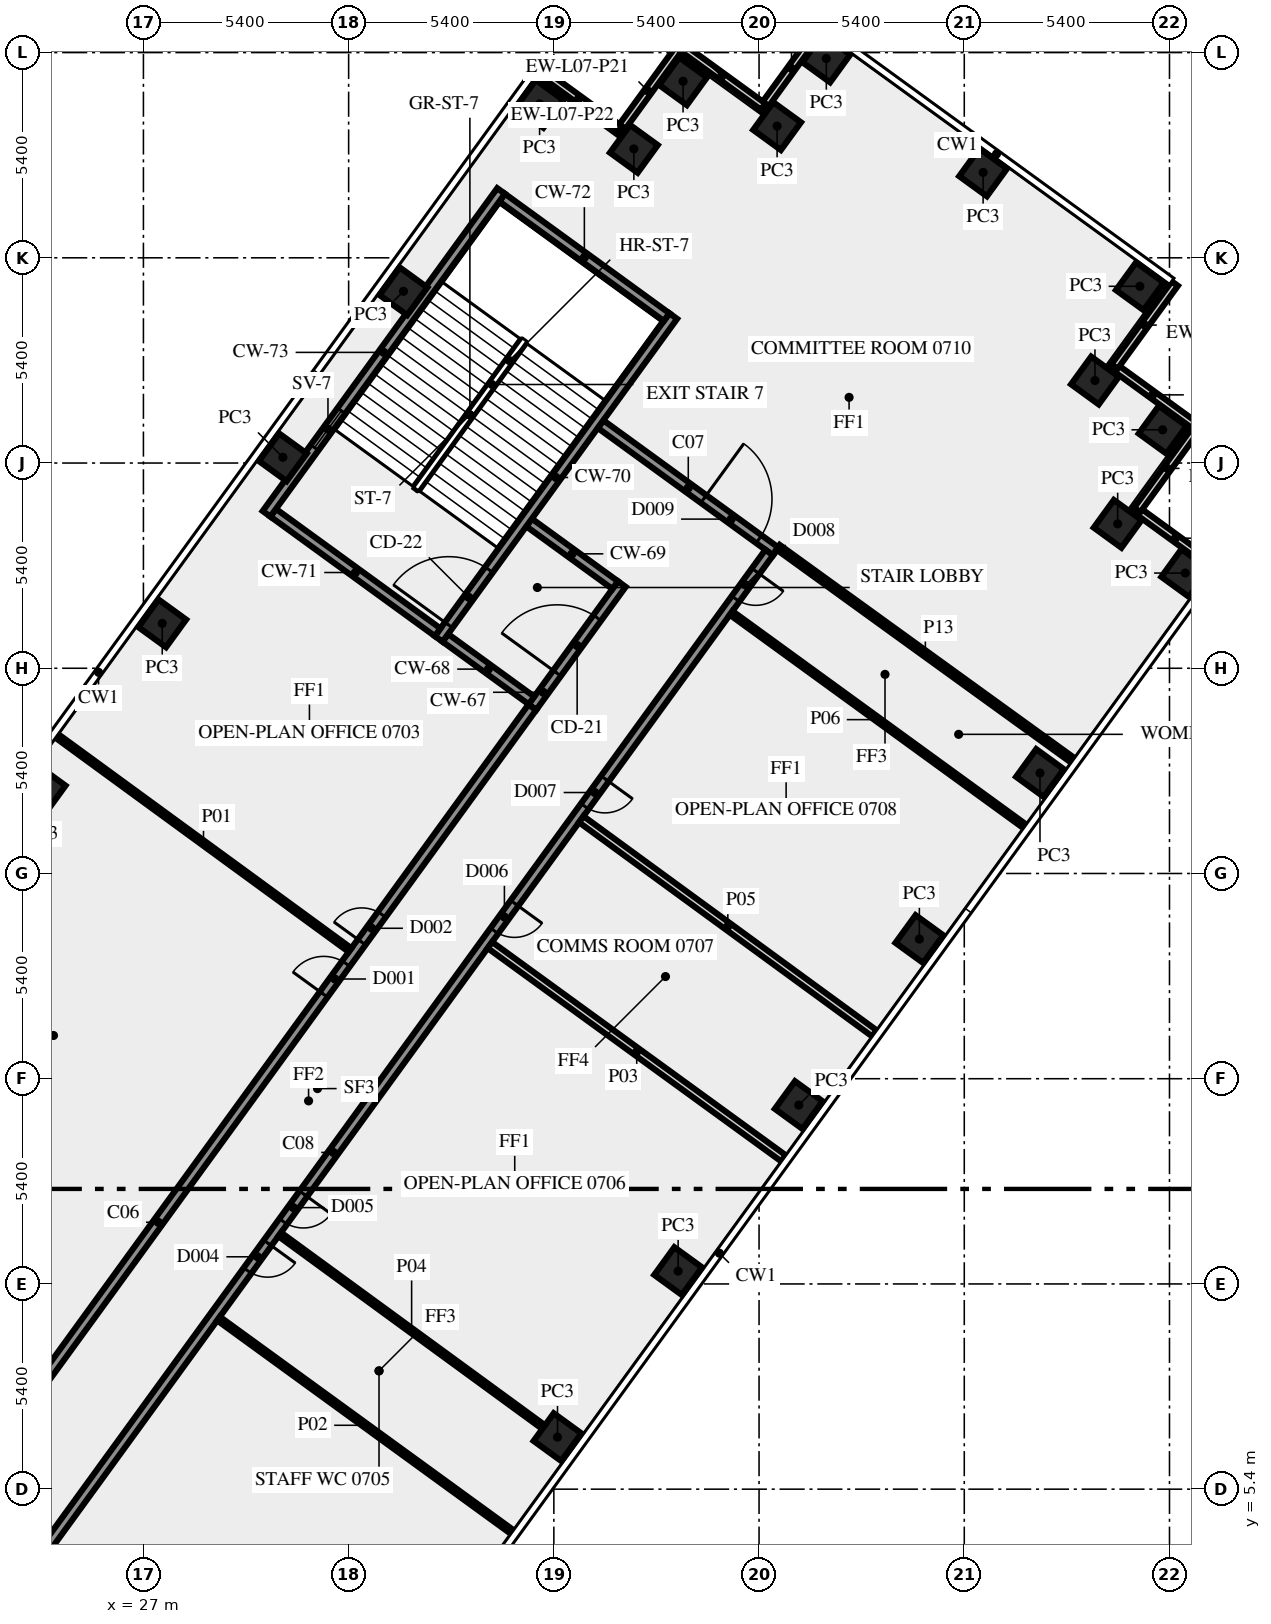
"""IFC4 building model, lengths in metres.
Left out: names, types, materials, properties, quantities, classifications, styles, units other than length and angle.
Written with IfcOpenShell. Run it as: python <this file> out.ifc"""

import sys

from ifc_helpers import new_model, si_unit, direction, frame, frame_2d, origin, origin_2d, place, context, subcontext, project, spatial, rectangle, extrude, element, fill, save


model = new_model("IFC4")
c1 = context("Model", 3, precision=1e-05, world=origin(), true_north=direction((0.0, 1.0)))
c2 = subcontext(c1, "Body", "Model", "MODEL_VIEW")
j1 = project(units=[si_unit("LENGTHUNIT", "METRE"), si_unit("PLANEANGLEUNIT", "RADIAN")], contexts=[c1])
p1 = place(None, origin())
s1 = spatial("IfcSite", under=j1, at=p1, CompositionType="ELEMENT")
p2 = place(p1, origin())
s2 = spatial("IfcBuilding", under=s1, at=p2, CompositionType="ELEMENT")
p3 = place(p2, frame((0.0, 0.0, 35.0)))
s3 = spatial("IfcBuildingStorey", under=s2, at=p3, CompositionType="ELEMENT", Elevation=35.0)
for number, where, z_axis, x_axis in (
    (1, (37.896, 6.769, 0.0), (0.0, 0.0, 1.0), (0.588, 0.809, 0.0)),
    (2, (41.07, 11.137, 0.0), (0.0, 0.0, 1.0), (0.588, 0.809, 0.0)),
    (3, (44.244, 15.506, 0.0), (0.0, 0.0, 1.0), (0.588, 0.809, 0.0)),
    (4, (47.418, 19.875, 0.0), (0.0, 0.0, 1.0), (0.588, 0.809, 0.0)),
    (5, (50.592, 24.243, 0.0), (0.0, 0.0, 1.0), (0.588, 0.809, 0.0)),
    (6, (54.415, 29.505, 0.0), (0.0, 0.0, 1.0), (0.588, 0.809, 0.0)),
    (7, (52.636, 30.8, 0.0), (0.0, 0.0, 1.0), (-0.809, 0.588, 0.0)),
    (8, (53.82, 33.275, 0.0), (0.0, 0.0, 1.0), (-0.809, 0.588, 0.0)),
    (9, (52.039, 34.571, 0.0), (0.0, 0.0, 1.0), (0.588, 0.809, 0.0)),
    (10, (53.22, 37.05, 0.0), (0.0, 0.0, 1.0), (-0.809, 0.588, 0.0)),
    (11, (49.096, 40.047, 0.0), (0.0, 0.0, 1.0), (-0.809, 0.588, 0.0)),
    (12, (44.97, 43.045, 0.0), (0.0, 0.0, 1.0), (-0.809, 0.588, 0.0)),
    (13, (43.675, 41.265, 0.0), (0.0, 0.0, 1.0), (-0.809, 0.588, 0.0)),
    (14, (41.2, 42.445, 0.0), (0.0, 0.0, 1.0), (-0.588, -0.809, 0.0)),
    (15, (39.906, 40.666, 0.0), (0.0, 0.0, 1.0), (-0.588, -0.809, 0.0)),
    (16, (37.425, 41.85, 0.0), (0.0, 0.0, 1.0), (-0.588, -0.809, 0.0)),
    (17, (33.843, 36.919, 0.0), (0.0, 0.0, 1.0), (-0.588, -0.809, 0.0)),
    (18, (30.669, 32.55, 0.0), (0.0, 0.0, 1.0), (-0.588, -0.809, 0.0)),
    (19, (27.495, 28.181, 0.0), (0.0, 0.0, 1.0), (-0.588, -0.809, 0.0)),
    (20, (24.321, 23.812, 0.0), (0.0, 0.0, 1.0), (-0.588, -0.809, 0.0)),
):
    element("IfcColumn", number, at=place(p3, frame(where, z_axis=z_axis, x_axis=x_axis)), inside=s3, PredefinedType="COLUMN", context=c2, shape_type="SweptSolid", body=[
        extrude(rectangle(XDim=0.9, YDim=0.9, at=origin_2d()), origin(), (0.0, 0.0, 1.0), 3.65),
    ])
p4 = place(p3, frame((55.247, 29.629, 0.0), z_axis=(0.0, 0.0, 1.0), x_axis=(-0.809033161865, 0.587762999008, 0.0)))
e21 = element("IfcWall", 21, at=p4, inside=s3, PredefinedType="SOLIDWALL", context=c2, shape_type="SweptSolid", body=[
    extrude(rectangle(XDim=2.7, YDim=0.2, at=frame_2d((1.35, 0.0))), origin(), (0.0, 0.0, 1.0), 3.65),
])
p5 = place(p3, frame((53.151, 31.167, 0.0), z_axis=(0.0, 0.0, 1.0), x_axis=(0.587779184282, 0.809021403008, 0.0)))
e22 = element("IfcWall", 22, at=p5, inside=s3, PredefinedType="SOLIDWALL", context=c2, shape_type="SweptSolid", body=[
    extrude(rectangle(XDim=2.7, YDim=0.2, at=frame_2d((1.35, 0.0))), origin(), (0.0, 0.0, 1.0), 3.65),
])
for number, where, z_axis, x_axis in (
    (23, (54.65, 33.4, 0.0), (0.0, 0.0, 1.0), (-0.809, 0.588, 0.0)),
    (24, (52.553, 34.938, 0.0), (0.0, 0.0, 1.0), (0.588, 0.809, 0.0)),
    (25, (44.846, 43.875, 0.0), (0.0, 0.0, 1.0), (-0.588, -0.809, 0.0)),
    (26, (43.308, 41.779, 0.0), (0.0, 0.0, 1.0), (-0.809, 0.588, 0.0)),
):
    element("IfcWall", number, at=place(p3, frame(where, z_axis=z_axis, x_axis=x_axis)), inside=s3, PredefinedType="SOLIDWALL", context=c2, shape_type="SweptSolid", body=[
        extrude(rectangle(XDim=2.7, YDim=0.2, at=frame_2d((1.35, 0.0))), origin(), (0.0, 0.0, 1.0), 3.65),
    ])
p6 = place(p3, frame((41.075, 43.278, 0.0), z_axis=(0.0, 0.0, 1.0), x_axis=(-0.587806000234, -0.809001919707, 0.0)))
e27 = element("IfcWall", 27, at=p6, inside=s3, PredefinedType="SOLIDWALL", context=c2, shape_type="SweptSolid", body=[
    extrude(rectangle(XDim=2.7, YDim=0.2, at=frame_2d((1.35, 0.0))), origin(), (0.0, 0.0, 1.0), 3.65),
])
p7 = place(p3, frame((39.537, 41.181, 0.0), z_axis=(0.0, 0.0, 1.0), x_axis=(-0.809033161865, 0.587762999008, 0.0)))
e28 = element("IfcWall", 28, at=p7, inside=s3, PredefinedType="SOLIDWALL", context=c2, shape_type="SweptSolid", body=[
    extrude(rectangle(XDim=2.7, YDim=0.2, at=frame_2d((1.35, 0.0))), origin(), (0.0, 0.0, 1.0), 3.65),
])
p8 = place(p3, frame((37.238, 25.98, 0.0), z_axis=(0.0, 0.0, 1.0), x_axis=(0.587772420479, 0.809026317077, 0.0)))
e29 = element("IfcWall", 29, at=p8, inside=s3, PredefinedType="SHEAR", context=c2, shape_type="SweptSolid", body=[
    extrude(rectangle(XDim=4.0, YDim=0.25, at=frame_2d((2.0, 0.0))), origin(), (0.0, 0.0, 1.0), 3.65),
])
p9 = place(p8, frame((1.1, 0.0, 0.0)))
e30 = element("IfcOpeningElement", 30, at=p9, cuts=e29, PredefinedType="OPENING", context=c2, shape_type="SweptSolid", body=[
    extrude(rectangle(XDim=1.8, YDim=2.1, at=frame_2d((0.9, 1.05))), frame((0.0, 0.135, 0.0), z_axis=(0.0, -1.0, 0.0), x_axis=(1.0, 0.0, 0.0)), (0.0, 0.0, 1.0), 0.27),
])
for number, where, z_axis, x_axis in (
    (31, (37.21, 26.154, 0.0), (0.0, 0.0, 1.0), (-0.809, 0.588, 0.0)),
    (32, (39.414, 29.188, 0.0), (0.0, 0.0, 1.0), (-0.809, 0.588, 0.0)),
):
    element("IfcWall", number, at=place(p3, frame(where, z_axis=z_axis, x_axis=x_axis)), inside=s3, PredefinedType="SHEAR", context=c2, shape_type="SweptSolid", body=[
        extrude(rectangle(XDim=2.8, YDim=0.25, at=frame_2d((1.4, 0.0))), origin(), (0.0, 0.0, 1.0), 3.65),
    ])
p10 = place(p3, frame((34.77, 27.772, 0.0), z_axis=(0.0, 0.0, 1.0), x_axis=(0.587795589702, 0.809009483706, 0.0)))
e33 = element("IfcWall", 33, at=p10, inside=s3, PredefinedType="SHEAR", context=c2, shape_type="SweptSolid", body=[
    extrude(rectangle(XDim=10.5, YDim=0.25, at=frame_2d((5.25, 0.0))), origin(), (0.0, 0.0, 1.0), 3.65),
])
p11 = place(p10, frame((0.45, 0.0, 0.0)))
e34 = element("IfcOpeningElement", 34, at=p11, cuts=e33, PredefinedType="OPENING", context=c2, shape_type="SweptSolid", body=[
    extrude(rectangle(XDim=1.8, YDim=2.1, at=frame_2d((0.9, 1.05))), frame((0.0, 0.135, 0.0), z_axis=(0.0, -1.0, 0.0), x_axis=(1.0, 0.0, 0.0)), (0.0, 0.0, 1.0), 0.27),
])
p12 = place(p3, frame((34.742, 27.947, 0.0), z_axis=(0.0, 0.0, 1.0), x_axis=(-0.8089984606, 0.587810760999, 0.0)))
e35 = element("IfcWall", 35, at=p12, inside=s3, PredefinedType="SHEAR", context=c2, shape_type="SweptSolid", body=[
    extrude(rectangle(XDim=5.35, YDim=0.25, at=frame_2d((2.675, 0.0))), origin(), (0.0, 0.0, 1.0), 3.65),
])
p13 = place(p3, frame((40.767, 36.24, 0.0), z_axis=(0.0, 0.0, 1.0), x_axis=(-0.809020161303, 0.587780893365, 0.0)))
e36 = element("IfcWall", 36, at=p13, inside=s3, PredefinedType="SHEAR", context=c2, shape_type="SweptSolid", body=[
    extrude(rectangle(XDim=5.35, YDim=0.25, at=frame_2d((2.675, 0.0))), origin(), (0.0, 0.0, 1.0), 3.65),
])
p14 = place(p3, frame((30.24, 31.064, 0.0), z_axis=(0.0, 0.0, 1.0), x_axis=(0.587795589702, 0.809009483706, 0.0)))
e37 = element("IfcWall", 37, at=p14, inside=s3, PredefinedType="SHEAR", context=c2, shape_type="SweptSolid", body=[
    extrude(rectangle(XDim=10.5, YDim=0.25, at=frame_2d((5.25, 0.0))), origin(), (0.0, 0.0, 1.0), 3.65),
])
p15 = place(p14, frame((2.15, 0.0, 1.0)))
e38 = element("IfcOpeningElement", 38, at=p15, cuts=e37, PredefinedType="OPENING", context=c2, shape_type="SweptSolid", body=[
    extrude(rectangle(XDim=1.2, YDim=1.2, at=frame_2d((0.6, 0.6))), frame((0.0, 0.135, 0.0), z_axis=(0.0, -1.0, 0.0), x_axis=(1.0, 0.0, 0.0)), (0.0, 0.0, 1.0), 0.27),
])
p16 = place(p3, frame((17.545, -1.125, 0.0), z_axis=(0.0, 0.0, 1.0), x_axis=(0.587786323093, 0.809016216391, 0.0)))
e39 = element("IfcWall", 39, at=p16, inside=s3, PredefinedType="SOLIDWALL", context=c2, shape_type="SweptSolid", body=[
    extrude(rectangle(XDim=33.493, YDim=0.25, at=frame_2d((16.747, 0.0))), origin(), (0.0, 0.0, 1.0), 3.65),
])
p17 = place(p16, frame((25.857, 0.0, 0.0)))
e40 = element("IfcOpeningElement", 40, at=p17, cuts=e39, PredefinedType="OPENING", context=c2, shape_type="SweptSolid", body=[
    extrude(rectangle(XDim=0.9, YDim=2.1, at=frame_2d((0.45, 1.05))), frame((0.0, 0.135, 0.0), z_axis=(0.0, -1.0, 0.0), x_axis=(1.0, 0.0, 0.0)), (0.0, 0.0, 1.0), 0.27),
])
p18 = place(p16, frame((24.157, 0.0, 0.0)))
e41 = element("IfcOpeningElement", 41, at=p18, cuts=e39, PredefinedType="OPENING", context=c2, shape_type="SweptSolid", body=[
    extrude(rectangle(XDim=1.0, YDim=2.1, at=frame_2d((0.5, 1.05))), frame((0.0, 0.135, 0.0), z_axis=(0.0, -1.0, 0.0), x_axis=(1.0, 0.0, 0.0)), (0.0, 0.0, 1.0), 0.27),
])
p19 = place(p3, frame((39.034, 33.42, 0.0), z_axis=(0.0, 0.0, 1.0), x_axis=(0.809023325802, -0.587776537732, 0.0)))
e42 = element("IfcWall", 42, at=p19, inside=s3, PredefinedType="SOLIDWALL", context=c2, shape_type="SweptSolid", body=[
    extrude(rectangle(XDim=5.695, YDim=0.25, at=frame_2d((2.848, 0.0))), origin(), (0.0, 0.0, 1.0), 3.65),
])
p20 = place(p19, frame((3.345, 0.0, 0.0)))
e43 = element("IfcOpeningElement", 43, at=p20, cuts=e42, PredefinedType="OPENING", context=c2, shape_type="SweptSolid", body=[
    extrude(rectangle(XDim=1.8, YDim=2.1, at=frame_2d((0.9, 1.05))), frame((0.0, 0.135, 0.0), z_axis=(0.0, -1.0, 0.0), x_axis=(1.0, 0.0, 0.0)), (0.0, 0.0, 1.0), 0.27),
])
p21 = place(p3, frame((43.467, 30.045, 0.0), z_axis=(0.0, 0.0, 1.0), x_axis=(-0.587784726077, -0.809017376692, 0.0)))
e44 = element("IfcWall", 44, at=p21, inside=s3, PredefinedType="SOLIDWALL", context=c2, shape_type="SweptSolid", body=[
    extrude(rectangle(XDim=39.02, YDim=0.25, at=frame_2d((19.51, 0.0))), origin(), (0.0, 0.0, 1.0), 3.65),
])
p22 = place(p21, frame((37.588, 0.0, 0.0)))
e45 = element("IfcOpeningElement", 45, at=p22, cuts=e44, PredefinedType="OPENING", context=c2, shape_type="SweptSolid", body=[
    extrude(rectangle(XDim=0.9, YDim=2.1, at=frame_2d((0.45, 1.05))), frame((0.0, 0.135, 0.0), z_axis=(0.0, -1.0, 0.0), x_axis=(1.0, 0.0, 0.0)), (0.0, 0.0, 1.0), 0.27),
])
p23 = place(p21, frame((20.855, 0.0, 0.0)))
e46 = element("IfcOpeningElement", 46, at=p23, cuts=e44, PredefinedType="OPENING", context=c2, shape_type="SweptSolid", body=[
    extrude(rectangle(XDim=0.9, YDim=2.1, at=frame_2d((0.45, 1.05))), frame((0.0, 0.135, 0.0), z_axis=(0.0, -1.0, 0.0), x_axis=(1.0, 0.0, 0.0)), (0.0, 0.0, 1.0), 0.27),
])
p24 = place(p21, frame((7.355, 0.0, 0.0)))
e47 = element("IfcOpeningElement", 47, at=p24, cuts=e44, PredefinedType="OPENING", context=c2, shape_type="SweptSolid", body=[
    extrude(rectangle(XDim=0.9, YDim=2.1, at=frame_2d((0.45, 1.05))), frame((0.0, 0.135, 0.0), z_axis=(0.0, -1.0, 0.0), x_axis=(1.0, 0.0, 0.0)), (0.0, 0.0, 1.0), 0.27),
])
p25 = place(p21, frame((11.404, 0.0, 0.0)))
e48 = element("IfcOpeningElement", 48, at=p25, cuts=e44, PredefinedType="OPENING", context=c2, shape_type="SweptSolid", body=[
    extrude(rectangle(XDim=0.9, YDim=2.1, at=frame_2d((0.45, 1.05))), frame((0.0, 0.135, 0.0), z_axis=(0.0, -1.0, 0.0), x_axis=(1.0, 0.0, 0.0)), (0.0, 0.0, 1.0), 0.27),
])
p26 = place(p21, frame((0.604, 0.0, 0.0)))
e49 = element("IfcOpeningElement", 49, at=p26, cuts=e44, PredefinedType="OPENING", context=c2, shape_type="SweptSolid", body=[
    extrude(rectangle(XDim=0.9, YDim=2.1, at=frame_2d((0.45, 1.05))), frame((0.0, 0.135, 0.0), z_axis=(0.0, -1.0, 0.0), x_axis=(1.0, 0.0, 0.0)), (0.0, 0.0, 1.0), 0.27),
])
p27 = place(p21, frame((22.455, 0.0, 0.0)))
e50 = element("IfcOpeningElement", 50, at=p27, cuts=e44, PredefinedType="OPENING", context=c2, shape_type="SweptSolid", body=[
    extrude(rectangle(XDim=0.9, YDim=2.1, at=frame_2d((0.45, 1.05))), frame((0.0, 0.135, 0.0), z_axis=(0.0, -1.0, 0.0), x_axis=(1.0, 0.0, 0.0)), (0.0, 0.0, 1.0), 0.27),
])
p28 = place(p3, frame((24.724, 25.217, 0.0), z_axis=(0.0, 0.0, 1.0), x_axis=(0.807606997933, -0.589721067023, 0.0)))
e51 = element("IfcWall", 51, at=p28, inside=s3, PredefinedType="PARTITIONING", context=c2, shape_type="SweptSolid", body=[
    extrude(rectangle(XDim=9.55, YDim=0.12, at=frame_2d((4.775, 0.0))), origin(), (0.0, 0.0, 1.0), 2.75),
])
p29 = place(p3, frame((36.702, 4.274, 0.0), z_axis=(0.0, 0.0, 1.0), x_axis=(-0.808998008689, 0.58781138296, 0.0)))
e52 = element("IfcWall", 52, at=p29, inside=s3, PredefinedType="PARTITIONING", context=c2, shape_type="SweptSolid", body=[
    extrude(rectangle(XDim=9.55, YDim=0.12, at=frame_2d((4.775, 0.0))), origin(), (0.0, 0.0, 1.0), 2.75),
])
p30 = place(p3, frame((43.844, 14.104, 0.0), z_axis=(0.0, 0.0, 1.0), x_axis=(-0.809102944047, 0.587666934526, 0.0)))
e53 = element("IfcWall", 53, at=p30, inside=s3, PredefinedType="SOLIDWALL", context=c2, shape_type="SweptSolid", body=[
    extrude(rectangle(XDim=9.55, YDim=0.2, at=frame_2d((4.775, 0.0))), origin(), (0.0, 0.0, 1.0), 2.75),
])
p31 = place(p3, frame((30.587, 12.104, 0.0), z_axis=(0.0, 0.0, 1.0), x_axis=(0.807590933527, -0.589743066161, 0.0)))
e54 = element("IfcWall", 54, at=p31, inside=s3, PredefinedType="PARTITIONING", context=c2, shape_type="SweptSolid", body=[
    extrude(rectangle(XDim=8.594, YDim=0.12, at=frame_2d((4.297, 0.0))), origin(), (0.0, 0.0, 1.0), 3.65),
])
p32 = place(p3, frame((38.522, 23.026, 0.0), z_axis=(0.0, 0.0, 1.0), x_axis=(0.807606997933, -0.589721067023, 0.0)))
e55 = element("IfcWall", 55, at=p32, inside=s3, PredefinedType="SOLIDWALL", context=c2, shape_type="SweptSolid", body=[
    extrude(rectangle(XDim=9.55, YDim=0.2, at=frame_2d((4.775, 0.0))), origin(), (0.0, 0.0, 1.0), 2.75),
])
p33 = place(p3, frame((50.192, 22.841, 0.0), z_axis=(0.0, 0.0, 1.0), x_axis=(-0.809033337127, 0.587762757767, 0.0)))
e56 = element("IfcWall", 56, at=p33, inside=s3, PredefinedType="PARTITIONING", context=c2, shape_type="SweptSolid", body=[
    extrude(rectangle(XDim=9.551, YDim=0.12, at=frame_2d((4.775, 0.0))), origin(), (0.0, 0.0, 1.0), 2.75),
])
p34 = place(p3, frame((43.698, 30.185, 0.0), z_axis=(0.0, 0.0, 1.0), x_axis=(0.810419489461, -0.58585002441, 0.0)))
e57 = element("IfcWall", 57, at=p34, inside=s3, PredefinedType="PARTITIONING", context=c2, shape_type="SweptSolid", body=[
    extrude(rectangle(XDim=9.57, YDim=0.15, at=frame_2d((4.785, 0.0))), origin(), (0.0, 0.0, 1.0), 2.75),
])
p35 = place(p9, origin())
e58 = element("IfcDoor", 58, at=p35, inside=s3, OperationType="DOUBLE_DOOR_SINGLE_SWING", PredefinedType="DOOR", context=c2, shape_type="SweptSolid", body=[
    extrude(rectangle(XDim=1.8, YDim=2.1, at=frame_2d((0.9, 1.05))), frame((0.0, 0.025, 0.0), z_axis=(0.0, -1.0, 0.0), x_axis=(1.0, 0.0, 0.0)), (0.0, 0.0, 1.0), 0.05),
])
fill(e30, e58)
p36 = place(p11, origin())
e59 = element("IfcDoor", 59, at=p36, inside=s3, OperationType="DOUBLE_DOOR_SINGLE_SWING", PredefinedType="DOOR", context=c2, shape_type="SweptSolid", body=[
    extrude(rectangle(XDim=1.8, YDim=2.1, at=frame_2d((0.9, 1.05))), frame((0.0, 0.025, 0.0), z_axis=(0.0, -1.0, 0.0), x_axis=(1.0, 0.0, 0.0)), (0.0, 0.0, 1.0), 0.05),
])
fill(e34, e59)
p37 = place(p15, origin())
e60 = element("IfcWindow", 60, at=p37, inside=s3, PartitioningType="SINGLE_PANEL", PredefinedType="WINDOW", context=c2, shape_type="SweptSolid", body=[
    extrude(rectangle(XDim=1.2, YDim=1.2, at=frame_2d((0.6, 0.6))), frame((0.0, 0.03, 0.0), z_axis=(0.0, -1.0, 0.0), x_axis=(1.0, 0.0, 0.0)), (0.0, 0.0, 1.0), 0.06),
])
fill(e38, e60)
p38 = place(p17, origin())
e61 = element("IfcDoor", 61, at=p38, inside=s3, OperationType="SINGLE_SWING_LEFT", PredefinedType="DOOR", context=c2, shape_type="SweptSolid", body=[
    extrude(rectangle(XDim=0.9, YDim=2.1, at=frame_2d((0.45, 1.05))), frame((0.0, 0.025, 0.0), z_axis=(0.0, -1.0, 0.0), x_axis=(1.0, 0.0, 0.0)), (0.0, 0.0, 1.0), 0.05),
])
fill(e40, e61)
p39 = place(p23, origin())
e62 = element("IfcDoor", 62, at=p39, inside=s3, OperationType="SINGLE_SWING_RIGHT", PredefinedType="DOOR", context=c2, shape_type="SweptSolid", body=[
    extrude(rectangle(XDim=0.9, YDim=2.1, at=frame_2d((0.45, 1.05))), frame((0.0, 0.025, 0.0), z_axis=(0.0, -1.0, 0.0), x_axis=(1.0, 0.0, 0.0)), (0.0, 0.0, 1.0), 0.05),
])
fill(e46, e62)
p40 = place(p24, origin())
e63 = element("IfcDoor", 63, at=p40, inside=s3, OperationType="SINGLE_SWING_RIGHT", PredefinedType="DOOR", context=c2, shape_type="SweptSolid", body=[
    extrude(rectangle(XDim=0.9, YDim=2.1, at=frame_2d((0.45, 1.05))), frame((0.0, 0.025, 0.0), z_axis=(0.0, -1.0, 0.0), x_axis=(1.0, 0.0, 0.0)), (0.0, 0.0, 1.0), 0.05),
])
fill(e47, e63)
p41 = place(p20, origin())
e64 = element("IfcDoor", 64, at=p41, inside=s3, OperationType="DOUBLE_DOOR_SINGLE_SWING", PredefinedType="DOOR", context=c2, shape_type="SweptSolid", body=[
    extrude(rectangle(XDim=1.8, YDim=2.1, at=frame_2d((0.9, 1.05))), frame((0.0, 0.025, 0.0), z_axis=(0.0, -1.0, 0.0), x_axis=(1.0, 0.0, 0.0)), (0.0, 0.0, 1.0), 0.05),
])
fill(e43, e64)
p42 = place(p25, origin())
e65 = element("IfcDoor", 65, at=p42, inside=s3, OperationType="SINGLE_SWING_RIGHT", PredefinedType="DOOR", context=c2, shape_type="SweptSolid", body=[
    extrude(rectangle(XDim=0.9, YDim=2.1, at=frame_2d((0.45, 1.05))), frame((0.0, 0.025, 0.0), z_axis=(0.0, -1.0, 0.0), x_axis=(1.0, 0.0, 0.0)), (0.0, 0.0, 1.0), 0.05),
])
fill(e48, e65)
p43 = place(p18, origin())
e66 = element("IfcDoor", 66, at=p43, inside=s3, OperationType="SINGLE_SWING_RIGHT", PredefinedType="DOOR", context=c2, shape_type="SweptSolid", body=[
    extrude(rectangle(XDim=1.0, YDim=2.1, at=frame_2d((0.5, 1.05))), frame((0.0, 0.025, 0.0), z_axis=(0.0, -1.0, 0.0), x_axis=(1.0, 0.0, 0.0)), (0.0, 0.0, 1.0), 0.05),
])
fill(e41, e66)
p44 = place(p26, origin())
e67 = element("IfcDoor", 67, at=p44, inside=s3, OperationType="SINGLE_SWING_RIGHT", PredefinedType="DOOR", context=c2, shape_type="SweptSolid", body=[
    extrude(rectangle(XDim=0.9, YDim=2.1, at=frame_2d((0.45, 1.05))), frame((0.0, 0.025, 0.0), z_axis=(0.0, -1.0, 0.0), x_axis=(1.0, 0.0, 0.0)), (0.0, 0.0, 1.0), 0.05),
])
fill(e49, e67)
p45 = place(p27, origin())
e68 = element("IfcDoor", 68, at=p45, inside=s3, OperationType="SINGLE_SWING_LEFT", PredefinedType="DOOR", context=c2, shape_type="SweptSolid", body=[
    extrude(rectangle(XDim=0.9, YDim=2.1, at=frame_2d((0.45, 1.05))), frame((0.0, 0.025, 0.0), z_axis=(0.0, -1.0, 0.0), x_axis=(1.0, 0.0, 0.0)), (0.0, 0.0, 1.0), 0.05),
])
fill(e50, e68)
save(model, sys.argv[1])
